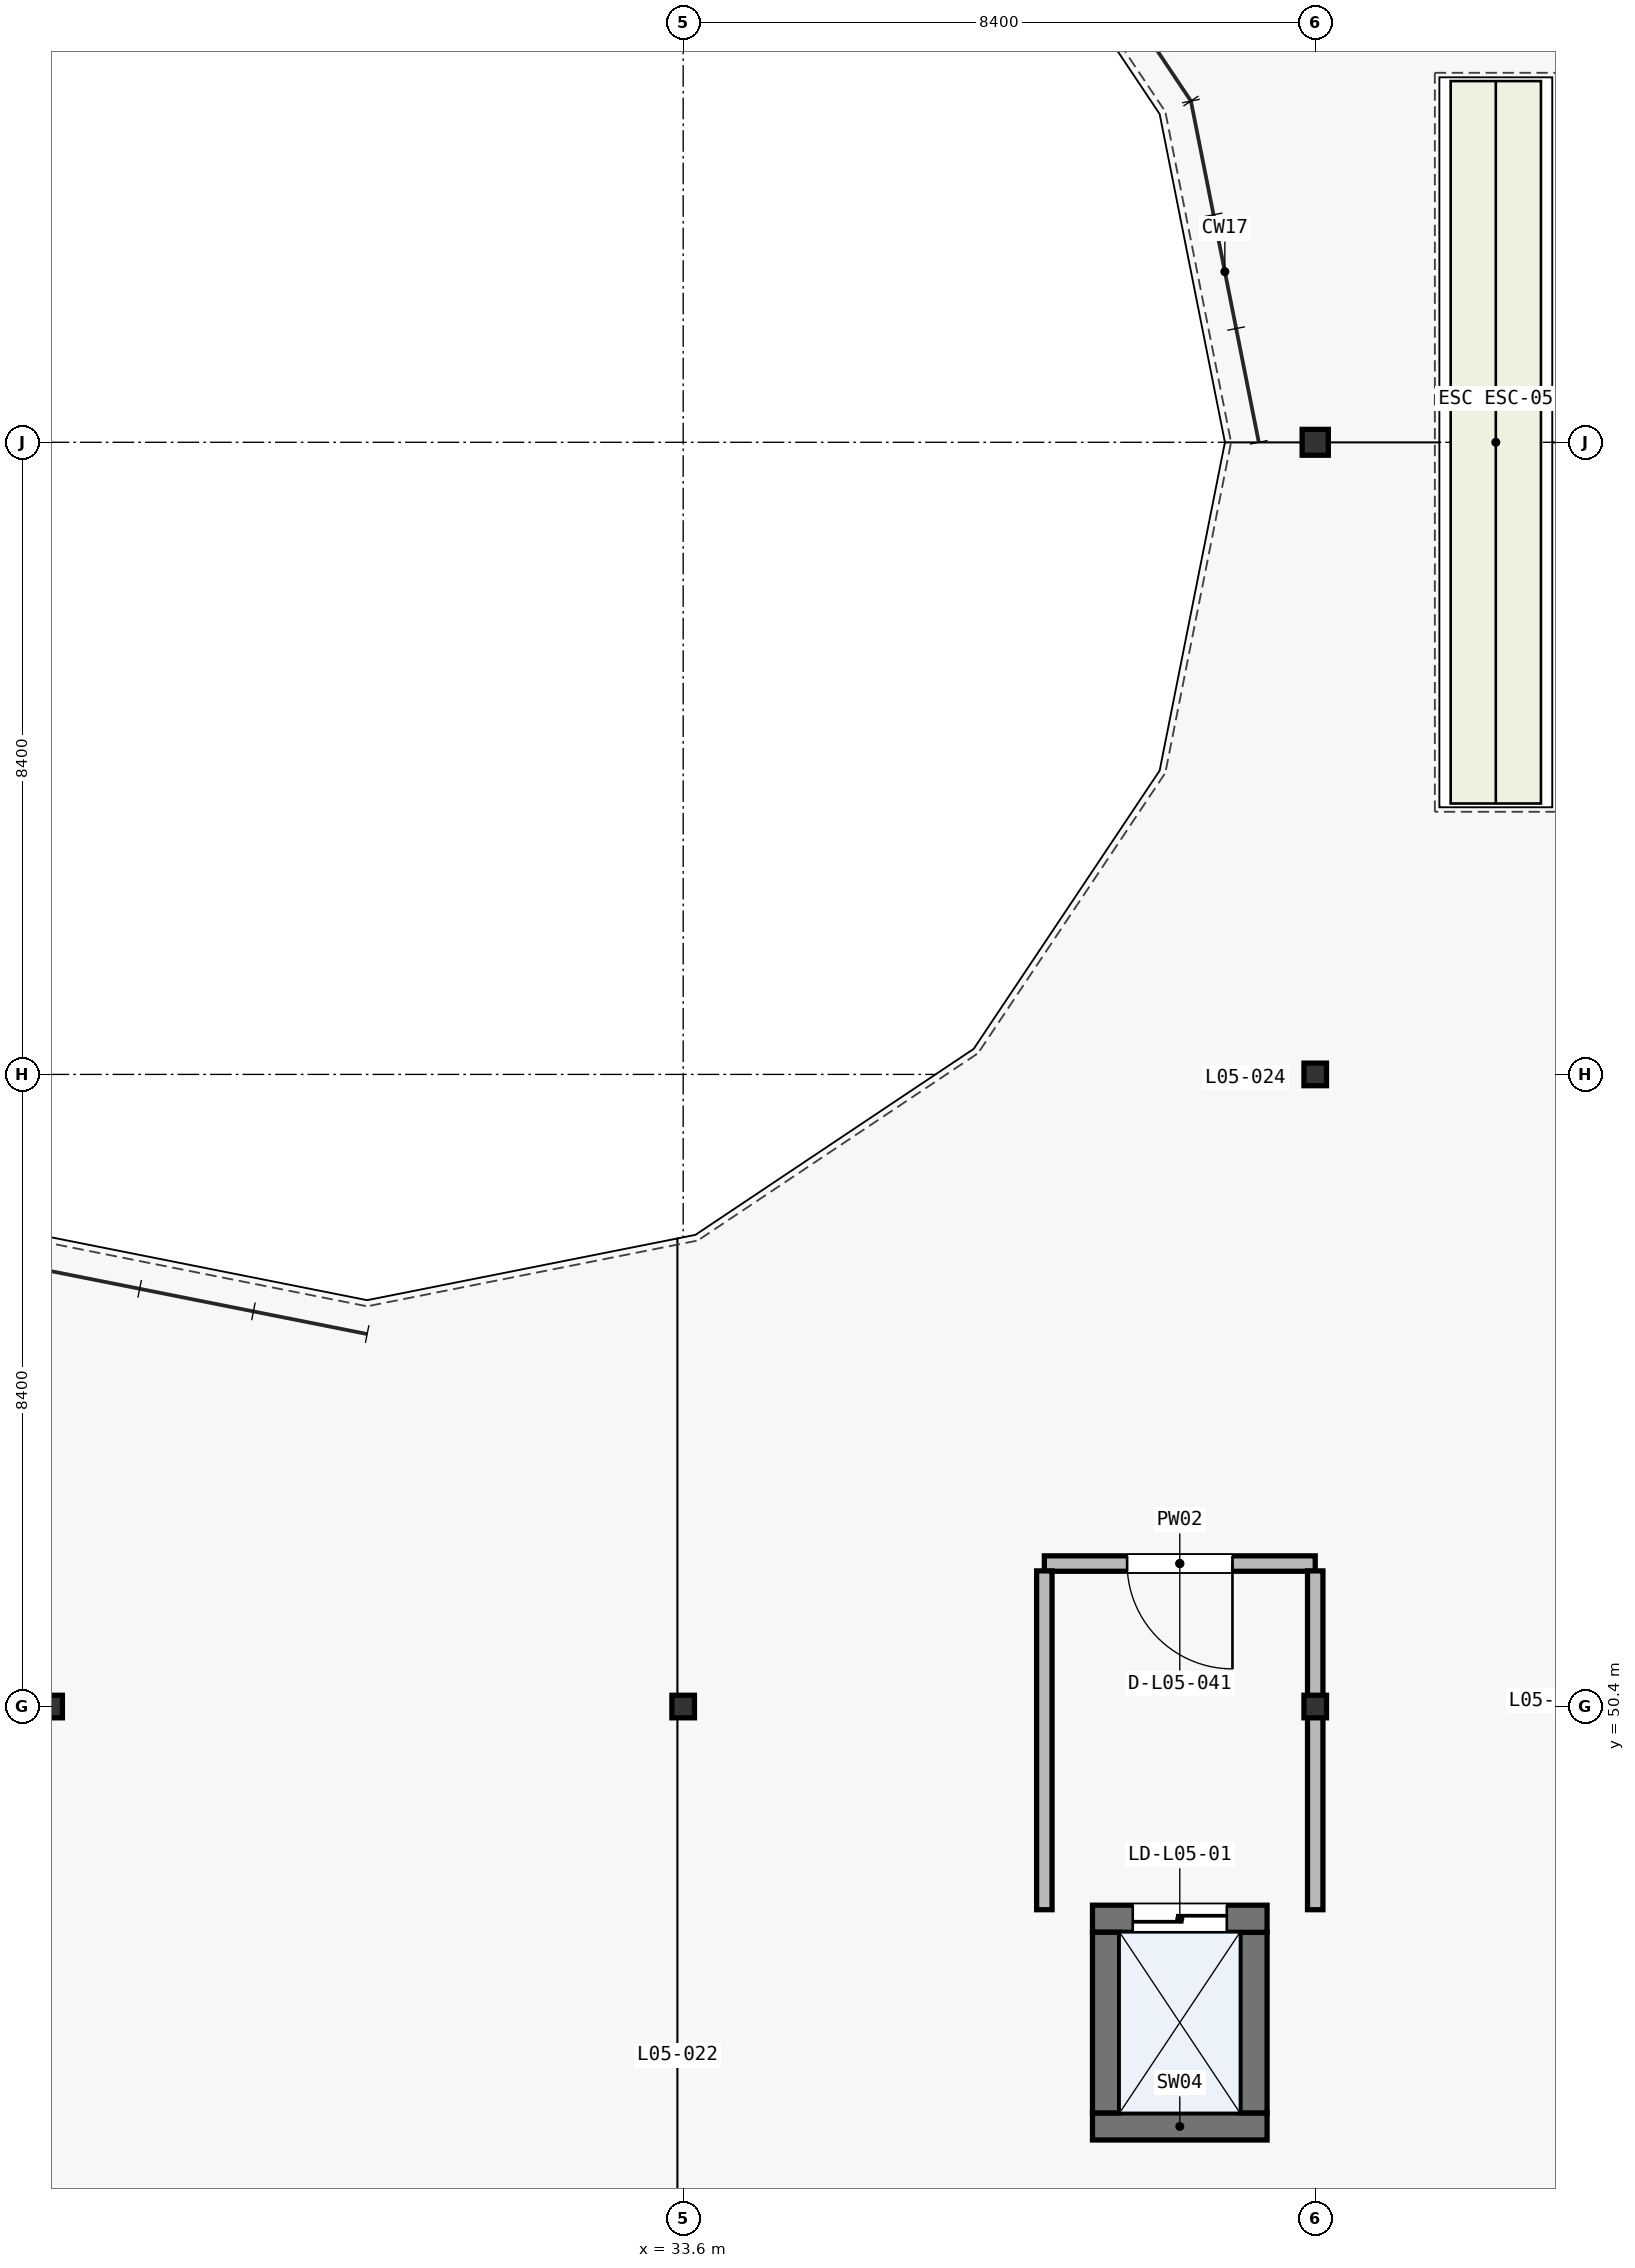
"""IFC4 building model, lengths in metres.
Left out: names, types, materials, properties, quantities, classifications, styles, units other than length and angle.
Written with IfcOpenShell. Run it as: python <this file> out.ifc"""

import sys

from ifc_helpers import new_model, si_unit, direction, frame, frame_2d, origin, origin_2d, place, context, subcontext, project, spatial, rectangle, i_section, extrude, element, fill, save


model = new_model("IFC4")
c1 = context("Model", 3, precision=1e-05, world=origin(), true_north=direction((0.0, 1.0)))
c2 = subcontext(c1, "Body", "Model", "MODEL_VIEW")
j1 = project(units=[si_unit("LENGTHUNIT", "METRE"), si_unit("PLANEANGLEUNIT", "RADIAN")], contexts=[c1])
p1 = place(None, origin())
s1 = spatial("IfcSite", under=j1, at=p1, CompositionType="ELEMENT")
p2 = place(p1, origin())
s2 = spatial("IfcBuilding", under=s1, at=p2, CompositionType="ELEMENT")
p3 = place(p2, frame((0.0, 0.0, 21.6)))
s3 = spatial("IfcBuildingStorey", under=s2, at=p3, CompositionType="ELEMENT", Elevation=21.6)
for number, where, z_axis, x_axis in (
    (1, (25.2, 50.4, 0.0), (0.0, 0.0, 1.0), (1.0, 0.0, 0.0)),
    (2, (33.6, 50.4, 0.0), (0.0, 0.0, 1.0), (1.0, 0.0, 0.0)),
    (3, (42.0, 50.4, 0.0), (0.0, 0.0, 1.0), (1.0, 0.0, 0.0)),
    (4, (42.0, 58.8, 0.0), (0.0, 0.0, 1.0), (1.0, 0.0, 0.0)),
):
    element("IfcColumn", number, at=place(p3, frame(where, z_axis=z_axis, x_axis=x_axis)), inside=s3, PredefinedType="COLUMN", context=c2, shape_type="SweptSolid", body=[
        extrude(i_section(OverallWidth=0.3, OverallDepth=0.3, WebThickness=0.01, FlangeThickness=0.015, FilletRadius=0.018, at=origin_2d()), origin(), (0.0, 0.0, 1.0), 5.1),
    ])
p4 = place(p3, frame((42.0, 67.2, 0.0), z_axis=(0.0, 0.0, 1.0), x_axis=(1.0, 0.0, 0.0)))
e5 = element("IfcColumn", 5, at=p4, inside=s3, PredefinedType="COLUMN", context=c2, shape_type="SweptSolid", body=[
    extrude(i_section(OverallWidth=0.348, OverallDepth=0.344, WebThickness=0.01, FlangeThickness=0.016, FilletRadius=0.02, at=origin_2d()), origin(), (0.0, 0.0, 1.0), 5.1),
])
p5 = place(p3, frame((39.04, 44.82, 0.0), z_axis=(0.0, 0.0, 1.0), x_axis=(1.0, 0.0, 0.0)))
e6 = element("IfcWall", 6, at=p5, inside=s3, PredefinedType="SHEAR", context=c2, shape_type="SweptSolid", body=[
    extrude(rectangle(XDim=2.32, YDim=0.36, at=frame_2d((1.16, 0.0))), origin(), (0.0, 0.0, 1.0), 4.845),
])
p6 = place(p3, frame((41.18, 45.0, 0.0), z_axis=(0.0, 0.0, 1.0), x_axis=(0.0, 1.0, 0.0)))
e7 = element("IfcWall", 7, at=p6, inside=s3, PredefinedType="SHEAR", context=c2, shape_type="SweptSolid", body=[
    extrude(rectangle(XDim=2.4, YDim=0.36, at=frame_2d((1.2, 0.0))), origin(), (0.0, 0.0, 1.0), 4.845),
])
p7 = place(p3, frame((41.36, 47.58, 0.0), z_axis=(0.0, 0.0, 1.0), x_axis=(-1.0, 0.0, 0.0)))
e8 = element("IfcWall", 8, at=p7, inside=s3, PredefinedType="SHEAR", context=c2, shape_type="SweptSolid", body=[
    extrude(rectangle(XDim=2.32, YDim=0.36, at=frame_2d((1.16, 0.0))), origin(), (0.0, 0.0, 1.0), 4.845),
])
p8 = place(p7, frame((0.535, 0.0, 0.0)))
e9 = element("IfcOpeningElement", 9, at=p8, cuts=e8, PredefinedType="OPENING", context=c2, shape_type="SweptSolid", body=[
    extrude(rectangle(XDim=1.25, YDim=2.2, at=frame_2d((0.625, 1.1))), frame((0.0, 0.19, 0.0), z_axis=(0.0, -1.0, 0.0), x_axis=(1.0, 0.0, 0.0)), (0.0, 0.0, 1.0), 0.38),
])
p9 = place(p3, frame((39.22, 47.4, 0.0), z_axis=(0.0, 0.0, 1.0), x_axis=(0.0, -1.0, 0.0)))
e10 = element("IfcWall", 10, at=p9, inside=s3, PredefinedType="SHEAR", context=c2, shape_type="SweptSolid", body=[
    extrude(rectangle(XDim=2.4, YDim=0.36, at=frame_2d((1.2, 0.0))), origin(), (0.0, 0.0, 1.0), 4.845),
])
p10 = place(p3, frame((42.0, 52.3, 0.0), z_axis=(0.0, 0.0, 1.0), x_axis=(-1.0, 0.0, 0.0)))
e11 = element("IfcWall", 11, at=p10, inside=s3, PredefinedType="PARTITIONING", context=c2, shape_type="SweptSolid", body=[
    extrude(rectangle(XDim=3.6, YDim=0.205, at=frame_2d((1.8, 0.0))), origin(), (0.0, 0.0, 1.0), 4.845),
])
p11 = place(p10, frame((1.1, 0.0, 0.0)))
e12 = element("IfcOpeningElement", 12, at=p11, cuts=e11, PredefinedType="OPENING", context=c2, shape_type="SweptSolid", body=[
    extrude(rectangle(XDim=1.4, YDim=2.15, at=frame_2d((0.7, 1.075))), frame((0.0, 0.113, 0.0), z_axis=(0.0, -1.0, 0.0), x_axis=(1.0, 0.0, 0.0)), (0.0, 0.0, 1.0), 0.225),
])
p12 = place(p3, frame((42.0, 47.7, 0.0), z_axis=(0.0, 0.0, 1.0), x_axis=(0.0, 1.0, 0.0)))
e13 = element("IfcWall", 13, at=p12, inside=s3, PredefinedType="PARTITIONING", context=c2, shape_type="SweptSolid", body=[
    extrude(rectangle(XDim=4.502, YDim=0.205, at=frame_2d((2.251, 0.0))), origin(), (0.0, 0.0, 1.0), 3.925),
])
p13 = place(p3, frame((38.4, 52.202, 0.0), z_axis=(0.0, 0.0, 1.0), x_axis=(0.0, -1.0, 0.0)))
e14 = element("IfcWall", 14, at=p13, inside=s3, PredefinedType="PARTITIONING", context=c2, shape_type="SweptSolid", body=[
    extrude(rectangle(XDim=4.502, YDim=0.205, at=frame_2d((2.251, 0.0))), origin(), (0.0, 0.0, 1.0), 4.845),
])
p14 = place(p8, frame((1.25, 0.0, 0.0), z_axis=(0.0, 0.0, 1.0), x_axis=(-1.0, 0.0, 0.0)))
e15 = element("IfcDoor", 15, at=p14, inside=s3, OperationType="DOUBLE_DOOR_SLIDING", PredefinedType="DOOR", context=c2, shape_type="SweptSolid", body=[
    extrude(rectangle(XDim=1.25, YDim=2.2, at=frame_2d((0.625, 1.1))), frame((0.0, 0.025, 0.0), z_axis=(0.0, -1.0, 0.0), x_axis=(1.0, 0.0, 0.0)), (0.0, 0.0, 1.0), 0.05),
])
fill(e9, e15)
p15 = place(p11, origin())
e16 = element("IfcDoor", 16, at=p15, inside=s3, OperationType="SINGLE_SWING_LEFT", PredefinedType="DOOR", context=c2, shape_type="SweptSolid", body=[
    extrude(rectangle(XDim=1.4, YDim=2.15, at=frame_2d((0.7, 1.075))), frame((0.0, 0.025, 0.0), z_axis=(0.0, -1.0, 0.0), x_axis=(1.0, 0.0, 0.0)), (0.0, 0.0, 1.0), 0.05),
])
fill(e12, e16)
save(model, sys.argv[1])
